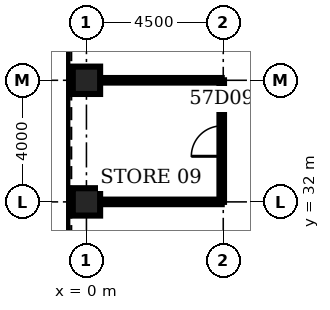
"""IFC4 building model, lengths in metres.
Left out: names, types, materials, properties, quantities, classifications, styles, units other than length and angle.
Written with IfcOpenShell. Run it as: python <this file> out.ifc"""

import sys

from ifc_helpers import new_model, si_unit, direction, frame, frame_2d, origin, origin_2d, place, context, subcontext, project, spatial, rectangle, hollow_rectangle, extrude, element, fill, save


model = new_model("IFC4")
c1 = context("Model", 3, precision=1e-05, world=origin(), true_north=direction((0.0, 1.0)))
c2 = subcontext(c1, "Body", "Model", "MODEL_VIEW")
j1 = project(units=[si_unit("LENGTHUNIT", "METRE"), si_unit("PLANEANGLEUNIT", "RADIAN")], contexts=[c1])
p1 = place(None, origin())
s1 = spatial("IfcSite", under=j1, at=p1, CompositionType="ELEMENT")
p2 = place(p1, origin())
s2 = spatial("IfcBuilding", under=s1, at=p2, CompositionType="ELEMENT")
p3 = place(p2, frame((0.0, 0.0, 253.0)))
s3 = spatial("IfcBuildingStorey", under=s2, at=p3, CompositionType="ELEMENT", Elevation=253.0)
for number, where, z_axis, x_axis in (
    (1, (0.0, 36.0, 0.0), (0.0, 0.0, 1.0), (1.0, 0.0, 0.0)),
    (2, (0.0, 32.0, 0.0), (0.0, 0.0, 1.0), (1.0, 0.0, 0.0)),
):
    element("IfcColumn", number, at=place(p3, frame(where, z_axis=z_axis, x_axis=x_axis)), inside=s3, PredefinedType="COLUMN", context=c2, shape_type="SweptSolid", body=[
        extrude(hollow_rectangle(XDim=0.9, YDim=0.9, WallThickness=0.07, at=origin_2d()), origin(), (0.0, 0.0, 1.0), 4.2),
    ])
for number, where, z_axis, x_axis in (
    (3, (0.45, 32.0, 0.0), (0.0, 0.0, 1.0), (1.0, 0.0, 0.0)),
    (4, (0.45, 36.0, 0.0), (0.0, 0.0, 1.0), (1.0, 0.0, 0.0)),
):
    element("IfcWall", number, at=place(p3, frame(where, z_axis=z_axis, x_axis=x_axis)), inside=s3, PredefinedType="PARTITIONING", context=c2, shape_type="SweptSolid", body=[
        extrude(rectangle(XDim=4.0, YDim=0.15, at=frame_2d((2.0, 0.0))), origin(), (0.0, 0.0, 1.0), 3.0),
    ])
p4 = place(p3, frame((4.45, 32.0, 0.0), z_axis=(0.0, 0.0, 1.0), x_axis=(0.0, 1.0, 0.0)))
e5 = element("IfcWall", 5, at=p4, inside=s3, PredefinedType="PARTITIONING", context=c2, shape_type="SweptSolid", body=[
    extrude(rectangle(XDim=4.0, YDim=0.15, at=frame_2d((2.0, 0.0))), origin(), (0.0, 0.0, 1.0), 3.0),
])
p5 = place(p4, frame((1.5, 0.0, 0.0)))
e6 = element("IfcOpeningElement", 6, at=p5, cuts=e5, PredefinedType="OPENING", context=c2, shape_type="SweptSolid", body=[
    extrude(rectangle(XDim=1.0, YDim=2.1, at=frame_2d((0.5, 1.05))), frame((0.0, 0.085, 0.0), z_axis=(0.0, -1.0, 0.0), x_axis=(1.0, 0.0, 0.0)), (0.0, 0.0, 1.0), 0.17),
])
p6 = place(p5, origin())
e7 = element("IfcDoor", 7, at=p6, inside=s3, OperationType="SINGLE_SWING_LEFT", PredefinedType="DOOR", context=c2, shape_type="SweptSolid", body=[
    extrude(rectangle(XDim=1.0, YDim=2.1, at=frame_2d((0.5, 1.05))), frame((0.0, 0.025, 0.0), z_axis=(0.0, -1.0, 0.0), x_axis=(1.0, 0.0, 0.0)), (0.0, 0.0, 1.0), 0.05),
])
fill(e6, e7)
save(model, sys.argv[1])
